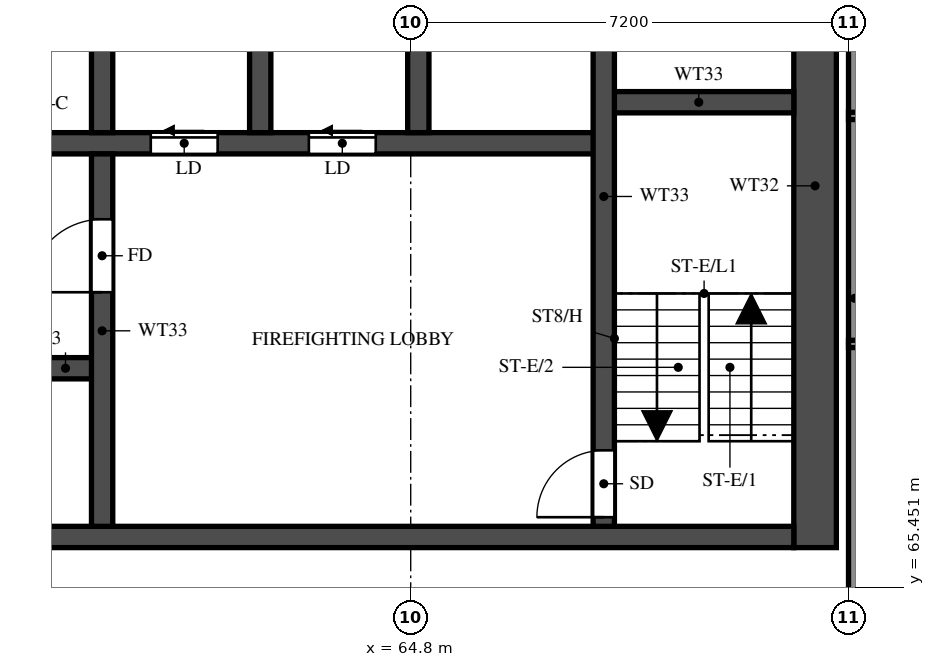
"""IFC4 building model, lengths in metres.
Left out: names, types, materials, properties, quantities, classifications, styles, units other than length and angle.
Written with IfcOpenShell. Run it as: python <this file> out.ifc"""

import sys

from ifc_helpers import new_model, si_unit, direction, frame, frame_2d, origin, place, context, subcontext, project, spatial, rectangle, extrude, element, fill, save


model = new_model("IFC4")
c1 = context("Model", 3, precision=1e-05, world=origin(), true_north=direction((0.0, 1.0)))
c2 = subcontext(c1, "Body", "Model", "MODEL_VIEW")
j1 = project(units=[si_unit("LENGTHUNIT", "METRE"), si_unit("PLANEANGLEUNIT", "RADIAN")], contexts=[c1])
p1 = place(None, origin())
s1 = spatial("IfcSite", under=j1, at=p1, CompositionType="ELEMENT")
p2 = place(p1, origin())
s2 = spatial("IfcBuilding", under=s1, at=p2, CompositionType="ELEMENT")
p3 = place(p2, frame((0.0, 0.0, 202.5)))
s3 = spatial("IfcBuildingStorey", under=s2, at=p3, CompositionType="ELEMENT", Elevation=202.5)
p4 = place(p3, frame((71.45, 66.1, 0.0), z_axis=(0.0, 0.0, 1.0), x_axis=(0.0, 1.0, 0.0)))
e1 = element("IfcWall", 1, at=p4, inside=s3, PredefinedType="SHEAR", context=c2, shape_type="SweptSolid", body=[
    extrude(rectangle(XDim=11.9, YDim=0.7, at=frame_2d((5.95, 0.0))), origin(), (0.0, 0.0, 1.0), 3.1),
])
p5 = place(p3, frame((29.7, 66.275, 0.0), z_axis=(0.0, 0.0, 1.0), x_axis=(1.0, 0.0, 0.0)))
e2 = element("IfcWall", 2, at=p5, inside=s3, PredefinedType="SHEAR", context=c2, shape_type="SweptSolid", body=[
    extrude(rectangle(XDim=41.4, YDim=0.35, at=frame_2d((20.7, 0.0))), origin(), (0.0, 0.0, 1.0), 3.1),
])
p6 = place(p5, frame((0.925, 0.0, 0.0)))
e3 = element("IfcOpeningElement", 3, at=p6, cuts=e2, PredefinedType="OPENING", context=c2, shape_type="SweptSolid", body=[
    extrude(rectangle(XDim=1.1, YDim=2.1, at=frame_2d((0.55, 1.05))), frame((0.0, 0.185, 0.0), z_axis=(0.0, -1.0, 0.0), x_axis=(1.0, 0.0, 0.0)), (0.0, 0.0, 1.0), 0.37),
])
p7 = place(p5, frame((3.712, 0.0, 0.0)))
e4 = element("IfcOpeningElement", 4, at=p7, cuts=e2, PredefinedType="OPENING", context=c2, shape_type="SweptSolid", body=[
    extrude(rectangle(XDim=1.8, YDim=2.1, at=frame_2d((0.9, 1.05))), frame((0.0, 0.185, 0.0), z_axis=(0.0, -1.0, 0.0), x_axis=(1.0, 0.0, 0.0)), (0.0, 0.0, 1.0), 0.37),
])
p8 = place(p3, frame((35.625, 69.05, 0.0), z_axis=(0.0, 0.0, 1.0), x_axis=(1.0, 0.0, 0.0)))
e5 = element("IfcWall", 5, at=p8, inside=s3, PredefinedType="SHEAR", context=c2, shape_type="SweptSolid", body=[
    extrude(rectangle(XDim=24.1, YDim=0.35, at=frame_2d((12.05, 0.0))), origin(), (0.0, 0.0, 1.0), 3.1),
])
p9 = place(p8, frame((1.0, 0.0, 0.0)))
e6 = element("IfcOpeningElement", 6, at=p9, cuts=e5, PredefinedType="OPENING", context=c2, shape_type="SweptSolid", body=[
    extrude(rectangle(XDim=1.1, YDim=2.1, at=frame_2d((0.55, 1.05))), frame((0.0, 0.185, 0.0), z_axis=(0.0, -1.0, 0.0), x_axis=(1.0, 0.0, 0.0)), (0.0, 0.0, 1.0), 0.37),
])
p10 = place(p8, frame((3.75, 0.0, 0.0)))
e7 = element("IfcOpeningElement", 7, at=p10, cuts=e5, PredefinedType="OPENING", context=c2, shape_type="SweptSolid", body=[
    extrude(rectangle(XDim=1.1, YDim=2.1, at=frame_2d((0.55, 1.05))), frame((0.0, 0.185, 0.0), z_axis=(0.0, -1.0, 0.0), x_axis=(1.0, 0.0, 0.0)), (0.0, 0.0, 1.0), 0.37),
])
p11 = place(p8, frame((6.5, 0.0, 0.0)))
e8 = element("IfcOpeningElement", 8, at=p11, cuts=e5, PredefinedType="OPENING", context=c2, shape_type="SweptSolid", body=[
    extrude(rectangle(XDim=1.1, YDim=2.1, at=frame_2d((0.55, 1.05))), frame((0.0, 0.185, 0.0), z_axis=(0.0, -1.0, 0.0), x_axis=(1.0, 0.0, 0.0)), (0.0, 0.0, 1.0), 0.37),
])
p12 = place(p8, frame((9.25, 0.0, 0.0)))
e9 = element("IfcOpeningElement", 9, at=p12, cuts=e5, PredefinedType="OPENING", context=c2, shape_type="SweptSolid", body=[
    extrude(rectangle(XDim=1.1, YDim=2.1, at=frame_2d((0.55, 1.05))), frame((0.0, 0.185, 0.0), z_axis=(0.0, -1.0, 0.0), x_axis=(1.0, 0.0, 0.0)), (0.0, 0.0, 1.0), 0.37),
])
p13 = place(p8, frame((12.0, 0.0, 0.0)))
e10 = element("IfcOpeningElement", 10, at=p13, cuts=e5, PredefinedType="OPENING", context=c2, shape_type="SweptSolid", body=[
    extrude(rectangle(XDim=1.1, YDim=2.1, at=frame_2d((0.55, 1.05))), frame((0.0, 0.185, 0.0), z_axis=(0.0, -1.0, 0.0), x_axis=(1.0, 0.0, 0.0)), (0.0, 0.0, 1.0), 0.37),
])
p14 = place(p8, frame((14.75, 0.0, 0.0)))
e11 = element("IfcOpeningElement", 11, at=p14, cuts=e5, PredefinedType="OPENING", context=c2, shape_type="SweptSolid", body=[
    extrude(rectangle(XDim=1.1, YDim=2.1, at=frame_2d((0.55, 1.05))), frame((0.0, 0.185, 0.0), z_axis=(0.0, -1.0, 0.0), x_axis=(1.0, 0.0, 0.0)), (0.0, 0.0, 1.0), 0.37),
])
p15 = place(p8, frame((17.625, 0.0, 0.0)))
e12 = element("IfcOpeningElement", 12, at=p15, cuts=e5, PredefinedType="OPENING", context=c2, shape_type="SweptSolid", body=[
    extrude(rectangle(XDim=1.1, YDim=2.1, at=frame_2d((0.55, 1.05))), frame((0.0, 0.185, 0.0), z_axis=(0.0, -1.0, 0.0), x_axis=(1.0, 0.0, 0.0)), (0.0, 0.0, 1.0), 0.37),
])
p16 = place(p8, frame((20.625, 0.0, 0.0)))
e13 = element("IfcOpeningElement", 13, at=p16, cuts=e5, PredefinedType="OPENING", context=c2, shape_type="SweptSolid", body=[
    extrude(rectangle(XDim=1.1, YDim=2.1, at=frame_2d((0.55, 1.05))), frame((0.0, 0.185, 0.0), z_axis=(0.0, -1.0, 0.0), x_axis=(1.0, 0.0, 0.0)), (0.0, 0.0, 1.0), 0.37),
])
p17 = place(p3, frame((32.825, 72.75, 0.0), z_axis=(0.0, 0.0, 1.0), x_axis=(1.0, 0.0, 0.0)))
e14 = element("IfcWall", 14, at=p17, inside=s3, PredefinedType="SHEAR", context=c2, shape_type="SweptSolid", body=[
    extrude(rectangle(XDim=35.15, YDim=0.35, at=frame_2d((17.575, 0.0))), origin(), (0.0, 0.0, 1.0), 3.1),
])
p18 = place(p17, frame((19.8, 0.0, 0.0)))
e15 = element("IfcOpeningElement", 15, at=p18, cuts=e14, PredefinedType="OPENING", context=c2, shape_type="SweptSolid", body=[
    extrude(rectangle(XDim=1.1, YDim=2.1, at=frame_2d((0.55, 1.05))), frame((0.0, 0.185, 0.0), z_axis=(0.0, -1.0, 0.0), x_axis=(1.0, 0.0, 0.0)), (0.0, 0.0, 1.0), 0.37),
])
p19 = place(p17, frame((27.7, 0.0, 0.0)))
e16 = element("IfcOpeningElement", 16, at=p19, cuts=e14, PredefinedType="OPENING", context=c2, shape_type="SweptSolid", body=[
    extrude(rectangle(XDim=1.1, YDim=2.1, at=frame_2d((0.55, 1.05))), frame((0.0, 0.185, 0.0), z_axis=(0.0, -1.0, 0.0), x_axis=(1.0, 0.0, 0.0)), (0.0, 0.0, 1.0), 0.37),
])
p20 = place(p17, frame((30.3, 0.0, 0.0)))
e17 = element("IfcOpeningElement", 17, at=p20, cuts=e14, PredefinedType="OPENING", context=c2, shape_type="SweptSolid", body=[
    extrude(rectangle(XDim=1.1, YDim=2.1, at=frame_2d((0.55, 1.05))), frame((0.0, 0.185, 0.0), z_axis=(0.0, -1.0, 0.0), x_axis=(1.0, 0.0, 0.0)), (0.0, 0.0, 1.0), 0.37),
])
p21 = place(p17, frame((3.8, 0.0, 0.0)))
e18 = element("IfcOpeningElement", 18, at=p21, cuts=e14, PredefinedType="OPENING", context=c2, shape_type="SweptSolid", body=[
    extrude(rectangle(XDim=1.1, YDim=2.1, at=frame_2d((0.55, 1.05))), frame((0.0, 0.185, 0.0), z_axis=(0.0, -1.0, 0.0), x_axis=(1.0, 0.0, 0.0)), (0.0, 0.0, 1.0), 0.37),
])
p22 = place(p17, frame((6.55, 0.0, 0.0)))
e19 = element("IfcOpeningElement", 19, at=p22, cuts=e14, PredefinedType="OPENING", context=c2, shape_type="SweptSolid", body=[
    extrude(rectangle(XDim=1.1, YDim=2.1, at=frame_2d((0.55, 1.05))), frame((0.0, 0.185, 0.0), z_axis=(0.0, -1.0, 0.0), x_axis=(1.0, 0.0, 0.0)), (0.0, 0.0, 1.0), 0.37),
])
p23 = place(p17, frame((9.3, 0.0, 0.0)))
e20 = element("IfcOpeningElement", 20, at=p23, cuts=e14, PredefinedType="OPENING", context=c2, shape_type="SweptSolid", body=[
    extrude(rectangle(XDim=1.1, YDim=2.1, at=frame_2d((0.55, 1.05))), frame((0.0, 0.185, 0.0), z_axis=(0.0, -1.0, 0.0), x_axis=(1.0, 0.0, 0.0)), (0.0, 0.0, 1.0), 0.37),
])
p24 = place(p17, frame((12.05, 0.0, 0.0)))
e21 = element("IfcOpeningElement", 21, at=p24, cuts=e14, PredefinedType="OPENING", context=c2, shape_type="SweptSolid", body=[
    extrude(rectangle(XDim=1.1, YDim=2.1, at=frame_2d((0.55, 1.05))), frame((0.0, 0.185, 0.0), z_axis=(0.0, -1.0, 0.0), x_axis=(1.0, 0.0, 0.0)), (0.0, 0.0, 1.0), 0.37),
])
p25 = place(p17, frame((14.8, 0.0, 0.0)))
e22 = element("IfcOpeningElement", 22, at=p25, cuts=e14, PredefinedType="OPENING", context=c2, shape_type="SweptSolid", body=[
    extrude(rectangle(XDim=1.1, YDim=2.1, at=frame_2d((0.55, 1.05))), frame((0.0, 0.185, 0.0), z_axis=(0.0, -1.0, 0.0), x_axis=(1.0, 0.0, 0.0)), (0.0, 0.0, 1.0), 0.37),
])
p26 = place(p17, frame((17.55, 0.0, 0.0)))
e23 = element("IfcOpeningElement", 23, at=p26, cuts=e14, PredefinedType="OPENING", context=c2, shape_type="SweptSolid", body=[
    extrude(rectangle(XDim=1.1, YDim=2.1, at=frame_2d((0.55, 1.05))), frame((0.0, 0.185, 0.0), z_axis=(0.0, -1.0, 0.0), x_axis=(1.0, 0.0, 0.0)), (0.0, 0.0, 1.0), 0.37),
])
p27 = place(p17, frame((0.938, 0.0, 0.0)))
e24 = element("IfcOpeningElement", 24, at=p27, cuts=e14, PredefinedType="OPENING", context=c2, shape_type="SweptSolid", body=[
    extrude(rectangle(XDim=1.1, YDim=2.1, at=frame_2d((0.55, 1.05))), frame((0.0, 0.185, 0.0), z_axis=(0.0, -1.0, 0.0), x_axis=(1.0, 0.0, 0.0)), (0.0, 0.0, 1.0), 0.37),
])
p28 = place(p3, frame((67.975, 73.425, 0.0), z_axis=(0.0, 0.0, 1.0), x_axis=(1.0, 0.0, 0.0)))
e25 = element("IfcWall", 25, at=p28, inside=s3, PredefinedType="SHEAR", context=c2, shape_type="SweptSolid", body=[
    extrude(rectangle(XDim=3.125, YDim=0.35, at=frame_2d((1.562, 0.0))), origin(), (0.0, 0.0, 1.0), 3.1),
])
p29 = place(p3, frame((67.975, 66.45, 0.0), z_axis=(0.0, 0.0, 1.0), x_axis=(0.0, 1.0, 0.0)))
e26 = element("IfcWall", 26, at=p29, inside=s3, PredefinedType="SHEAR", context=c2, shape_type="SweptSolid", body=[
    extrude(rectangle(XDim=10.85, YDim=0.35, at=frame_2d((5.425, 0.0))), origin(), (0.0, 0.0, 1.0), 3.1),
])
p30 = place(p29, frame((0.15, 0.0, 0.0)))
e27 = element("IfcOpeningElement", 27, at=p30, cuts=e26, PredefinedType="OPENING", context=c2, shape_type="SweptSolid", body=[
    extrude(rectangle(XDim=1.1, YDim=2.1, at=frame_2d((0.55, 1.05))), frame((0.0, 0.185, 0.0), z_axis=(0.0, -1.0, 0.0), x_axis=(1.0, 0.0, 0.0)), (0.0, 0.0, 1.0), 0.37),
])
p31 = place(p3, frame((59.725, 66.45, 0.0), z_axis=(0.0, 0.0, 1.0), x_axis=(0.0, 1.0, 0.0)))
e28 = element("IfcWall", 28, at=p31, inside=s3, PredefinedType="SHEAR", context=c2, shape_type="SweptSolid", body=[
    extrude(rectangle(XDim=6.125, YDim=0.35, at=frame_2d((3.062, 0.0))), origin(), (0.0, 0.0, 1.0), 3.1),
])
p32 = place(p31, frame((3.85, 0.0, 0.0)))
e29 = element("IfcOpeningElement", 29, at=p32, cuts=e28, PredefinedType="OPENING", context=c2, shape_type="SweptSolid", body=[
    extrude(rectangle(XDim=1.2, YDim=2.1, at=frame_2d((0.6, 1.05))), frame((0.0, 0.185, 0.0), z_axis=(0.0, -1.0, 0.0), x_axis=(1.0, 0.0, 0.0)), (0.0, 0.0, 1.0), 0.37),
])
for number, where, z_axis, x_axis in (
    (30, (59.725, 72.925, 0.0), (0.0, 0.0, 1.0), (0.0, 1.0, 0.0)),
    (31, (62.325, 72.925, 0.0), (0.0, 0.0, 1.0), (0.0, 1.0, 0.0)),
    (32, (64.925, 72.925, 0.0), (0.0, 0.0, 1.0), (0.0, 1.0, 0.0)),
):
    element("IfcWall", number, at=place(p3, frame(where, z_axis=z_axis, x_axis=x_axis)), inside=s3, PredefinedType="SHEAR", context=c2, shape_type="SweptSolid", body=[
        extrude(rectangle(XDim=2.95, YDim=0.35, at=frame_2d((1.475, 0.0))), origin(), (0.0, 0.0, 1.0), 3.1),
    ])
p33 = place(p3, frame((72.1, 62.4, 0.0), z_axis=(0.0, 0.0, 1.0), x_axis=(0.0, 1.0, 0.0)))
e33 = element("IfcWall", 33, at=p33, inside=s3, PredefinedType="SOLIDWALL", context=c2, shape_type="SweptSolid", body=[
    extrude(rectangle(XDim=15.6, YDim=0.2, at=frame_2d((7.8, 0.0))), origin(), (0.0, 0.0, 1.0), 3.1),
])
p34 = place(p3, frame((72.0, 69.45, 0.0), z_axis=(0.0, 0.0, 1.0), x_axis=(1.0, 0.0, 0.0)))
e34 = element("IfcWall", 34, at=p34, inside=s3, PredefinedType="PARTITIONING", context=c2, shape_type="SweptSolid", body=[
    extrude(rectangle(XDim=5.1, YDim=0.12, at=frame_2d((2.55, 0.0))), origin(), (0.0, 0.0, 1.0), 3.1),
])
p35 = place(p3, frame((72.0, 73.2, 0.0), z_axis=(0.0, 0.0, 1.0), x_axis=(1.0, 0.0, 0.0)))
e35 = element("IfcWall", 35, at=p35, inside=s3, PredefinedType="PARTITIONING", context=c2, shape_type="SweptSolid", body=[
    extrude(rectangle(XDim=14.275, YDim=0.12, at=frame_2d((7.137, 0.0))), origin(), (0.0, 0.0, 1.0), 3.1),
])
p36 = place(p35, frame((5.7, 0.0, 0.0)))
e36 = element("IfcOpeningElement", 36, at=p36, cuts=e35, PredefinedType="OPENING", context=c2, shape_type="SweptSolid", body=[
    extrude(rectangle(XDim=0.9, YDim=2.1, at=frame_2d((0.45, 1.05))), frame((0.0, 0.07, 0.0), z_axis=(0.0, -1.0, 0.0), x_axis=(1.0, 0.0, 0.0)), (0.0, 0.0, 1.0), 0.14),
])
p37 = place(p30, origin())
e37 = element("IfcDoor", 37, at=p37, inside=s3, OperationType="SINGLE_SWING_LEFT", PredefinedType="DOOR", context=c2, shape_type="SweptSolid", body=[
    extrude(rectangle(XDim=1.1, YDim=2.1, at=frame_2d((0.55, 1.05))), frame((0.0, 0.025, 0.0), z_axis=(0.0, -1.0, 0.0), x_axis=(1.0, 0.0, 0.0)), (0.0, 0.0, 1.0), 0.05),
])
fill(e27, e37)
p38 = place(p32, origin())
e38 = element("IfcDoor", 38, at=p38, inside=s3, OperationType="SINGLE_SWING_LEFT", PredefinedType="DOOR", context=c2, shape_type="SweptSolid", body=[
    extrude(rectangle(XDim=1.2, YDim=2.1, at=frame_2d((0.6, 1.05))), frame((0.0, 0.025, 0.0), z_axis=(0.0, -1.0, 0.0), x_axis=(1.0, 0.0, 0.0)), (0.0, 0.0, 1.0), 0.05),
])
fill(e29, e38)
p39 = place(p19, origin())
e39 = element("IfcDoor", 39, at=p39, inside=s3, OperationType="SLIDING_TO_LEFT", PredefinedType="DOOR", context=c2, shape_type="SweptSolid", body=[
    extrude(rectangle(XDim=1.1, YDim=2.1, at=frame_2d((0.55, 1.05))), frame((0.0, 0.025, 0.0), z_axis=(0.0, -1.0, 0.0), x_axis=(1.0, 0.0, 0.0)), (0.0, 0.0, 1.0), 0.05),
])
fill(e16, e39)
p40 = place(p20, origin())
e40 = element("IfcDoor", 40, at=p40, inside=s3, OperationType="SLIDING_TO_LEFT", PredefinedType="DOOR", context=c2, shape_type="SweptSolid", body=[
    extrude(rectangle(XDim=1.1, YDim=2.1, at=frame_2d((0.55, 1.05))), frame((0.0, 0.025, 0.0), z_axis=(0.0, -1.0, 0.0), x_axis=(1.0, 0.0, 0.0)), (0.0, 0.0, 1.0), 0.05),
])
fill(e17, e40)
save(model, sys.argv[1])
